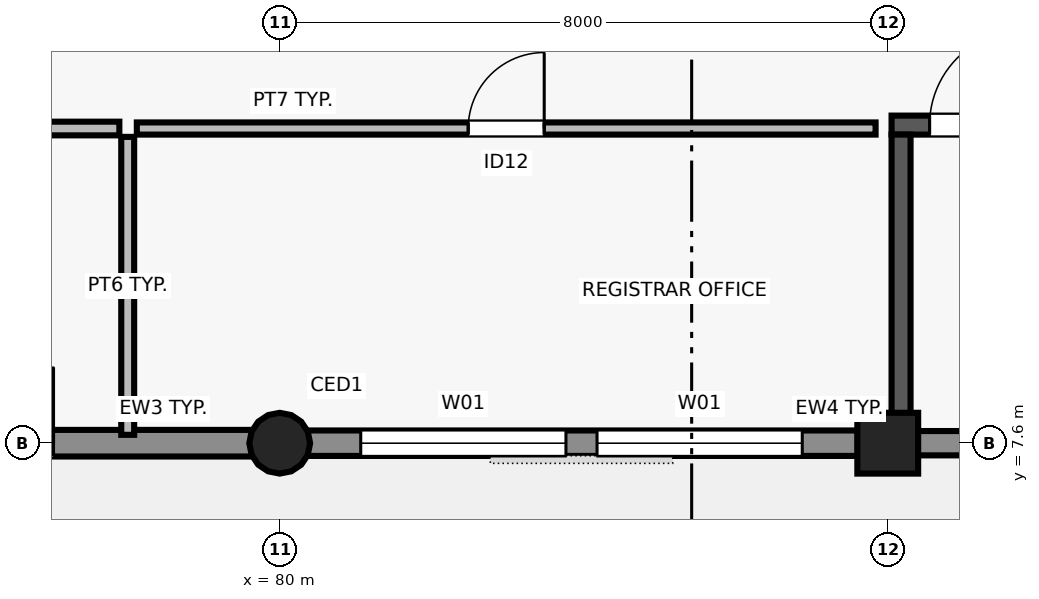
"""IFC4 building model, lengths in metres.
Left out: names, types, materials, properties, quantities, classifications, styles, units other than length and angle.
Written with IfcOpenShell. Run it as: python <this file> out.ifc"""

import sys

from ifc_helpers import new_model, si_unit, direction, frame, frame_2d, origin, origin_2d, place, context, subcontext, project, spatial, rectangle, circle, extrude, element, fill, save


model = new_model("IFC4")
c1 = context("Model", 3, precision=1e-05, world=origin(), true_north=direction((0.0, 1.0)))
c2 = subcontext(c1, "Body", "Model", "MODEL_VIEW")
j1 = project(units=[si_unit("LENGTHUNIT", "METRE"), si_unit("PLANEANGLEUNIT", "RADIAN")], contexts=[c1])
p1 = place(None, origin())
s1 = spatial("IfcSite", under=j1, at=p1, CompositionType="ELEMENT")
p2 = place(p1, origin())
s2 = spatial("IfcBuilding", under=s1, at=p2, CompositionType="ELEMENT")
p3 = place(p2, origin())
s3 = spatial("IfcBuildingStorey", under=s2, at=p3, CompositionType="ELEMENT", Elevation=0.0)
p4 = place(p3, frame((80.0, 7.6, 0.0), z_axis=(0.0, 0.0, 1.0), x_axis=(1.0, 0.0, 0.0)))
e1 = element("IfcColumn", 1, at=p4, inside=s3, PredefinedType="COLUMN", context=c2, shape_type="SweptSolid", body=[
    extrude(circle(Radius=0.4, at=origin_2d()), origin(), (0.0, 0.0, 1.0), 4.5),
])
p5 = place(p3, frame((88.0, 7.6, 0.0), z_axis=(0.0, 0.0, 1.0), x_axis=(1.0, 0.0, 0.0)))
e2 = element("IfcColumn", 2, at=p5, inside=s3, PredefinedType="COLUMN", context=c2, shape_type="SweptSolid", body=[
    extrude(rectangle(XDim=0.8, YDim=0.8, at=origin_2d()), origin(), (0.0, 0.0, 1.0), 4.5),
])
p6 = place(p3, frame((72.385, 7.6, 0.0), z_axis=(0.0, 0.0, 1.0), x_axis=(1.0, 0.0, 0.0)))
e3 = element("IfcWall", 3, at=p6, inside=s3, PredefinedType="SOLIDWALL", context=c2, shape_type="SweptSolid", body=[
    extrude(rectangle(XDim=7.279, YDim=0.35, at=frame_2d((3.64, 0.0))), origin(), (0.0, 0.0, 1.0), 3.54),
])
p7 = place(p6, frame((2.639, 0.0, 0.0)))
e4 = element("IfcOpeningElement", 4, at=p7, cuts=e3, PredefinedType="OPENING", context=c2, shape_type="SweptSolid", body=[
    extrude(rectangle(XDim=2.0, YDim=2.4, at=frame_2d((1.0, 1.2))), frame((0.0, 0.185, 0.0), z_axis=(0.0, -1.0, 0.0), x_axis=(1.0, 0.0, 0.0)), (0.0, 0.0, 1.0), 0.37),
])
p8 = place(p3, frame((80.336, 7.6, 0.0), z_axis=(0.0, 0.0, 1.0), x_axis=(1.0, 0.0, 0.0)))
e5 = element("IfcWall", 5, at=p8, inside=s3, PredefinedType="SOLIDWALL", context=c2, shape_type="SweptSolid", body=[
    extrude(rectangle(XDim=7.269, YDim=0.335, at=frame_2d((3.635, 0.0))), origin(), (0.0, 0.0, 1.0), 3.72),
])
p9 = place(p8, frame((0.73, 0.0, 0.9)))
e6 = element("IfcOpeningElement", 6, at=p9, cuts=e5, PredefinedType="OPENING", context=c2, shape_type="SweptSolid", body=[
    extrude(rectangle(XDim=2.7, YDim=1.8, at=frame_2d((1.35, 0.9))), frame((0.0, 0.177, 0.0), z_axis=(0.0, -1.0, 0.0), x_axis=(1.0, 0.0, 0.0)), (0.0, 0.0, 1.0), 0.355),
])
p10 = place(p8, frame((3.839, 0.0, 0.9)))
e7 = element("IfcOpeningElement", 7, at=p10, cuts=e5, PredefinedType="OPENING", context=c2, shape_type="SweptSolid", body=[
    extrude(rectangle(XDim=2.7, YDim=1.8, at=frame_2d((1.35, 0.9))), frame((0.0, 0.177, 0.0), z_axis=(0.0, -1.0, 0.0), x_axis=(1.0, 0.0, 0.0)), (0.0, 0.0, 1.0), 0.355),
])
p11 = place(p3, frame((88.395, 7.6, 0.0), z_axis=(0.0, 0.0, 1.0), x_axis=(1.0, 0.0, 0.0)))
e8 = element("IfcWall", 8, at=p11, inside=s3, PredefinedType="SOLIDWALL", context=c2, shape_type="SweptSolid", body=[
    extrude(rectangle(XDim=7.21, YDim=0.32, at=frame_2d((3.605, 0.0))), origin(), (0.0, 0.0, 1.0), 4.22),
])
p12 = place(p11, frame((2.88, 0.0, 0.0)))
e9 = element("IfcOpeningElement", 9, at=p12, cuts=e8, PredefinedType="OPENING", context=c2, shape_type="SweptSolid", body=[
    extrude(rectangle(XDim=1.45, YDim=2.2, at=frame_2d((0.725, 1.1))), frame((0.0, 0.17, 0.0), z_axis=(0.0, -1.0, 0.0), x_axis=(1.0, 0.0, 0.0)), (0.0, 0.0, 1.0), 0.34),
])
p13 = place(p3, frame((88.05, 11.785, 0.0), z_axis=(0.0, 0.0, 1.0), x_axis=(1.0, 0.0, 0.0)))
e10 = element("IfcWall", 10, at=p13, inside=s3, PredefinedType="SHEAR", context=c2, shape_type="SweptSolid", body=[
    extrude(rectangle(XDim=7.9, YDim=0.25, at=frame_2d((3.95, 0.0))), origin(), (0.0, 0.0, 1.0), 4.22),
])
p14 = place(p13, frame((0.5, 0.0, 0.0)))
e11 = element("IfcOpeningElement", 11, at=p14, cuts=e10, PredefinedType="OPENING", context=c2, shape_type="SweptSolid", body=[
    extrude(rectangle(XDim=1.25, YDim=2.2, at=frame_2d((0.625, 1.1))), frame((0.0, 0.135, 0.0), z_axis=(0.0, -1.0, 0.0), x_axis=(1.0, 0.0, 0.0)), (0.0, 0.0, 1.0), 0.27),
])
p15 = place(p3, frame((88.175, 7.9, 0.0), z_axis=(0.0, 0.0, 1.0), x_axis=(0.0, 1.0, 0.0)))
e12 = element("IfcWall", 12, at=p15, inside=s3, PredefinedType="SHEAR", context=c2, shape_type="SweptSolid", body=[
    extrude(rectangle(XDim=3.76, YDim=0.25, at=frame_2d((1.88, 0.0))), origin(), (0.0, 0.0, 1.0), 4.22),
])
p16 = place(p3, frame((62.72, 11.74, 0.0), z_axis=(0.0, 0.0, 1.0), x_axis=(1.0, 0.0, 0.0)))
e13 = element("IfcWall", 13, at=p16, inside=s3, PredefinedType="PARTITIONING", context=c2, shape_type="SweptSolid", body=[
    extrude(rectangle(XDim=15.17, YDim=0.18, at=frame_2d((7.585, 0.0))), origin(), (0.0, 0.0, 1.0), 4.2),
])
p17 = place(p16, frame((7.105, 0.0, 0.0)))
e14 = element("IfcOpeningElement", 14, at=p17, cuts=e13, PredefinedType="OPENING", context=c2, shape_type="SweptSolid", body=[
    extrude(rectangle(XDim=0.96, YDim=2.15, at=frame_2d((0.48, 1.075))), frame((0.0, 0.1, 0.0), z_axis=(0.0, -1.0, 0.0), x_axis=(1.0, 0.0, 0.0)), (0.0, 0.0, 1.0), 0.2),
])
p18 = place(p3, frame((78.0, 7.71, 0.0), z_axis=(0.0, 0.0, 1.0), x_axis=(0.0, 1.0, 0.0)))
e15 = element("IfcWall", 15, at=p18, inside=s3, PredefinedType="PARTITIONING", context=c2, shape_type="SweptSolid", body=[
    extrude(rectangle(XDim=3.92, YDim=0.17, at=frame_2d((1.96, 0.0))), origin(), (0.0, 0.0, 1.0), 4.2),
])
p19 = place(p3, frame((78.12, 11.74, 0.0), z_axis=(0.0, 0.0, 1.0), x_axis=(1.0, 0.0, 0.0)))
e16 = element("IfcWall", 16, at=p19, inside=s3, PredefinedType="PARTITIONING", context=c2, shape_type="SweptSolid", body=[
    extrude(rectangle(XDim=9.72, YDim=0.16, at=frame_2d((4.86, 0.0))), origin(), (0.0, 0.0, 1.0), 4.2),
])
p20 = place(p19, frame((4.36, 0.0, 0.0)))
e17 = element("IfcOpeningElement", 17, at=p20, cuts=e16, PredefinedType="OPENING", context=c2, shape_type="SweptSolid", body=[
    extrude(rectangle(XDim=1.0, YDim=2.15, at=frame_2d((0.5, 1.075))), frame((0.0, 0.09, 0.0), z_axis=(0.0, -1.0, 0.0), x_axis=(1.0, 0.0, 0.0)), (0.0, 0.0, 1.0), 0.18),
])
p21 = place(p7, frame((2.0, 0.0, 0.0), z_axis=(0.0, 0.0, 1.0), x_axis=(-1.0, 0.0, 0.0)))
e18 = element("IfcDoor", 18, at=p21, inside=s3, OperationType="DOUBLE_DOOR_SINGLE_SWING", PredefinedType="DOOR", context=c2, shape_type="SweptSolid", body=[
    extrude(rectangle(XDim=2.0, YDim=2.4, at=frame_2d((1.0, 1.2))), frame((0.0, 0.025, 0.0), z_axis=(0.0, -1.0, 0.0), x_axis=(1.0, 0.0, 0.0)), (0.0, 0.0, 1.0), 0.05),
])
fill(e4, e18)
p22 = place(p9, origin())
e19 = element("IfcWindow", 19, at=p22, inside=s3, PartitioningType="SINGLE_PANEL", PredefinedType="WINDOW", context=c2, shape_type="SweptSolid", body=[
    extrude(rectangle(XDim=2.7, YDim=1.8, at=frame_2d((1.35, 0.9))), frame((0.0, 0.03, 0.0), z_axis=(0.0, -1.0, 0.0), x_axis=(1.0, 0.0, 0.0)), (0.0, 0.0, 1.0), 0.06),
])
fill(e6, e19)
p23 = place(p10, origin())
e20 = element("IfcWindow", 20, at=p23, inside=s3, PartitioningType="SINGLE_PANEL", PredefinedType="WINDOW", context=c2, shape_type="SweptSolid", body=[
    extrude(rectangle(XDim=2.7, YDim=1.8, at=frame_2d((1.35, 0.9))), frame((0.0, 0.03, 0.0), z_axis=(0.0, -1.0, 0.0), x_axis=(1.0, 0.0, 0.0)), (0.0, 0.0, 1.0), 0.06),
])
fill(e7, e20)
p24 = place(p14, origin())
e21 = element("IfcDoor", 21, at=p24, inside=s3, OperationType="SINGLE_SWING_RIGHT", PredefinedType="DOOR", context=c2, shape_type="SweptSolid", body=[
    extrude(rectangle(XDim=1.25, YDim=2.2, at=frame_2d((0.625, 1.1))), frame((0.0, 0.025, 0.0), z_axis=(0.0, -1.0, 0.0), x_axis=(1.0, 0.0, 0.0)), (0.0, 0.0, 1.0), 0.05),
])
fill(e11, e21)
p25 = place(p20, origin())
e22 = element("IfcDoor", 22, at=p25, inside=s3, OperationType="SINGLE_SWING_RIGHT", PredefinedType="DOOR", context=c2, shape_type="SweptSolid", body=[
    extrude(rectangle(XDim=1.0, YDim=2.15, at=frame_2d((0.5, 1.075))), frame((0.0, 0.025, 0.0), z_axis=(0.0, -1.0, 0.0), x_axis=(1.0, 0.0, 0.0)), (0.0, 0.0, 1.0), 0.05),
])
fill(e17, e22)
save(model, sys.argv[1])
